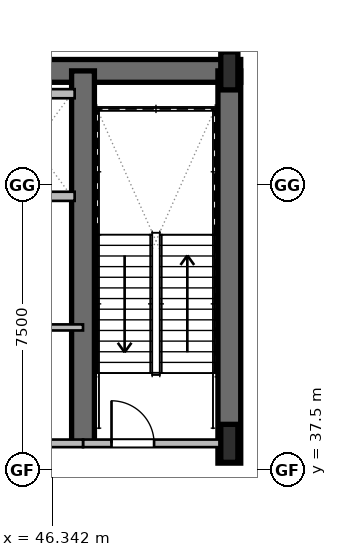
"""IFC4 building model, lengths in metres.
Left out: names, types, materials, properties, quantities, classifications, styles, units other than length and angle.
Written with IfcOpenShell. Run it as: python <this file> out.ifc"""

import sys

from ifc_helpers import new_model, si_unit, direction, frame, frame_2d, origin, origin_2d, place, context, subcontext, project, spatial, rectangle, i_section, extrude, element, fill, save


model = new_model("IFC4")
c1 = context("Model", 3, precision=1e-05, world=origin(), true_north=direction((0.0, 1.0)))
c2 = subcontext(c1, "Body", "Model", "MODEL_VIEW")
j1 = project(units=[si_unit("LENGTHUNIT", "METRE"), si_unit("PLANEANGLEUNIT", "RADIAN")], contexts=[c1])
p1 = place(None, origin())
s1 = spatial("IfcSite", under=j1, at=p1, CompositionType="ELEMENT")
p2 = place(p1, origin())
s2 = spatial("IfcBuilding", under=s1, at=p2, CompositionType="ELEMENT")
p3 = place(p2, frame((0.0, 0.0, 15.6)))
s3 = spatial("IfcBuildingStorey", under=s2, at=p3, CompositionType="ELEMENT", Elevation=15.6)
p4 = place(p3, frame((23.7, 48.0, 0.0), z_axis=(0.0, 0.0, 1.0), x_axis=(1.0, 0.0, 0.0)))
e1 = element("IfcWall", 1, at=p4, inside=s3, PredefinedType="SHEAR", context=c2, shape_type="SweptSolid", body=[
    extrude(rectangle(XDim=27.6, YDim=0.6, at=frame_2d((13.8, 0.0))), origin(), (0.0, 0.0, 1.0), 4.8),
])
p5 = place(p3, frame((51.0, 37.68, 0.0), z_axis=(0.0, 0.0, 1.0), x_axis=(0.0, 1.0, 0.0)))
e2 = element("IfcWall", 2, at=p5, inside=s3, PredefinedType="SHEAR", context=c2, shape_type="SweptSolid", body=[
    extrude(rectangle(XDim=10.32, YDim=0.6, at=frame_2d((5.16, 0.0))), origin(), (0.0, 0.0, 1.0), 4.8),
])
p6 = place(p3, frame((47.15, 38.2, 0.0), z_axis=(0.0, 0.0, 1.0), x_axis=(0.0, 1.0, 0.0)))
e3 = element("IfcWall", 3, at=p6, inside=s3, PredefinedType="SHEAR", context=c2, shape_type="SweptSolid", body=[
    extrude(rectangle(XDim=9.8, YDim=0.6, at=frame_2d((4.9, 0.0))), origin(), (0.0, 0.0, 1.0), 4.8),
])
for number, where, z_axis, x_axis in (
    (4, (51.0, 38.2, 0.0), (0.0, 0.0, 1.0), (1.0, 0.0, 0.0)),
    (5, (51.0, 48.0, 0.0), (0.0, 0.0, 1.0), (1.0, 0.0, 0.0)),
):
    element("IfcColumn", number, at=place(p3, frame(where, z_axis=z_axis, x_axis=x_axis)), inside=s3, PredefinedType="COLUMN", context=c2, shape_type="SweptSolid", body=[
        extrude(i_section(OverallWidth=0.45, OverallDepth=1.0, WebThickness=0.022, FlangeThickness=0.04, at=origin_2d()), origin(), (0.0, 0.0, 1.0), 4.8),
    ])
p7 = place(p3, frame((47.15, 38.2, 0.0), z_axis=(0.0, 0.0, 1.0), x_axis=(1.0, 0.0, 0.0)))
e6 = element("IfcWall", 6, at=p7, inside=s3, PredefinedType="PARTITIONING", context=c2, shape_type="SweptSolid", body=[
    extrude(rectangle(XDim=3.85, YDim=0.2, at=frame_2d((1.925, 0.0))), origin(), (0.0, 0.0, 1.0), 3.68),
])
p8 = place(p7, frame((0.75, 0.0, 0.0)))
e7 = element("IfcOpeningElement", 7, at=p8, cuts=e6, PredefinedType="OPENING", context=c2, shape_type="SweptSolid", body=[
    extrude(rectangle(XDim=1.12, YDim=2.1, at=frame_2d((0.56, 1.05))), frame((0.0, 0.11, 0.0), z_axis=(0.0, -1.0, 0.0), x_axis=(1.0, 0.0, 0.0)), (0.0, 0.0, 1.0), 0.22),
])
p9 = place(p3, frame((30.8, 38.2, 0.0), z_axis=(0.0, 0.0, 1.0), x_axis=(1.0, 0.0, 0.0)))
e8 = element("IfcWall", 8, at=p9, inside=s3, PredefinedType="PARTITIONING", context=c2, shape_type="SweptSolid", body=[
    extrude(rectangle(XDim=16.35, YDim=0.2, at=frame_2d((8.175, 0.0))), origin(), (0.0, 0.0, 1.0), 3.68),
])
p10 = place(p9, frame((2.95, 0.0, 0.0)))
e9 = element("IfcOpeningElement", 9, at=p10, cuts=e8, PredefinedType="OPENING", context=c2, shape_type="SweptSolid", body=[
    extrude(rectangle(XDim=1.12, YDim=2.1, at=frame_2d((0.56, 1.05))), frame((0.0, 0.11, 0.0), z_axis=(0.0, -1.0, 0.0), x_axis=(1.0, 0.0, 0.0)), (0.0, 0.0, 1.0), 0.22),
])
p11 = place(p9, frame((8.23, 0.0, 0.0)))
e10 = element("IfcOpeningElement", 10, at=p11, cuts=e8, PredefinedType="OPENING", context=c2, shape_type="SweptSolid", body=[
    extrude(rectangle(XDim=1.12, YDim=2.1, at=frame_2d((0.56, 1.05))), frame((0.0, 0.11, 0.0), z_axis=(0.0, -1.0, 0.0), x_axis=(1.0, 0.0, 0.0)), (0.0, 0.0, 1.0), 0.22),
])
for number, where, z_axis, x_axis in (
    (11, (44.77, 44.7, 0.0), (0.0, 0.0, 1.0), (1.0, 0.0, 0.0)),
    (12, (44.77, 47.4, 0.0), (0.0, 0.0, 1.0), (1.0, 0.0, 0.0)),
):
    element("IfcWall", number, at=place(p3, frame(where, z_axis=z_axis, x_axis=x_axis)), inside=s3, PredefinedType="PARTITIONING", context=c2, shape_type="SweptSolid", body=[
        extrude(rectangle(XDim=2.16, YDim=0.24, at=frame_2d((1.08, 0.0))), origin(), (0.0, 0.0, 1.0), 4.48),
    ])
p12 = place(p3, frame((40.4, 41.25, 0.0), z_axis=(0.0, 0.0, 1.0), x_axis=(1.0, 0.0, 0.0)))
e13 = element("IfcWall", 13, at=p12, inside=s3, PredefinedType="PARTITIONING", context=c2, shape_type="SweptSolid", body=[
    extrude(rectangle(XDim=6.75, YDim=0.16, at=frame_2d((3.375, 0.0))), origin(), (0.0, 0.0, 1.0), 4.48),
])
p13 = place(p12, frame((0.66, 0.0, 0.0)))
e14 = element("IfcOpeningElement", 14, at=p13, cuts=e13, PredefinedType="OPENING", context=c2, shape_type="SweptSolid", body=[
    extrude(rectangle(XDim=0.85, YDim=2.05, at=frame_2d((0.425, 1.025))), frame((0.0, 0.09, 0.0), z_axis=(0.0, -1.0, 0.0), x_axis=(1.0, 0.0, 0.0)), (0.0, 0.0, 1.0), 0.18),
])
p14 = place(p12, frame((2.755, 0.0, 0.0)))
e15 = element("IfcOpeningElement", 15, at=p14, cuts=e13, PredefinedType="OPENING", context=c2, shape_type="SweptSolid", body=[
    extrude(rectangle(XDim=0.85, YDim=2.05, at=frame_2d((0.425, 1.025))), frame((0.0, 0.09, 0.0), z_axis=(0.0, -1.0, 0.0), x_axis=(1.0, 0.0, 0.0)), (0.0, 0.0, 1.0), 0.18),
])
p15 = place(p12, frame((4.83, 0.0, 0.0)))
e16 = element("IfcOpeningElement", 16, at=p15, cuts=e13, PredefinedType="OPENING", context=c2, shape_type="SweptSolid", body=[
    extrude(rectangle(XDim=0.85, YDim=2.05, at=frame_2d((0.425, 1.025))), frame((0.0, 0.09, 0.0), z_axis=(0.0, -1.0, 0.0), x_axis=(1.0, 0.0, 0.0)), (0.0, 0.0, 1.0), 0.18),
])
p16 = place(p8, origin())
e17 = element("IfcDoor", 17, at=p16, inside=s3, OperationType="SINGLE_SWING_RIGHT", PredefinedType="DOOR", context=c2, shape_type="SweptSolid", body=[
    extrude(rectangle(XDim=1.12, YDim=2.1, at=frame_2d((0.56, 1.05))), frame((0.0, 0.025, 0.0), z_axis=(0.0, -1.0, 0.0), x_axis=(1.0, 0.0, 0.0)), (0.0, 0.0, 1.0), 0.05),
])
fill(e7, e17)
save(model, sys.argv[1])
